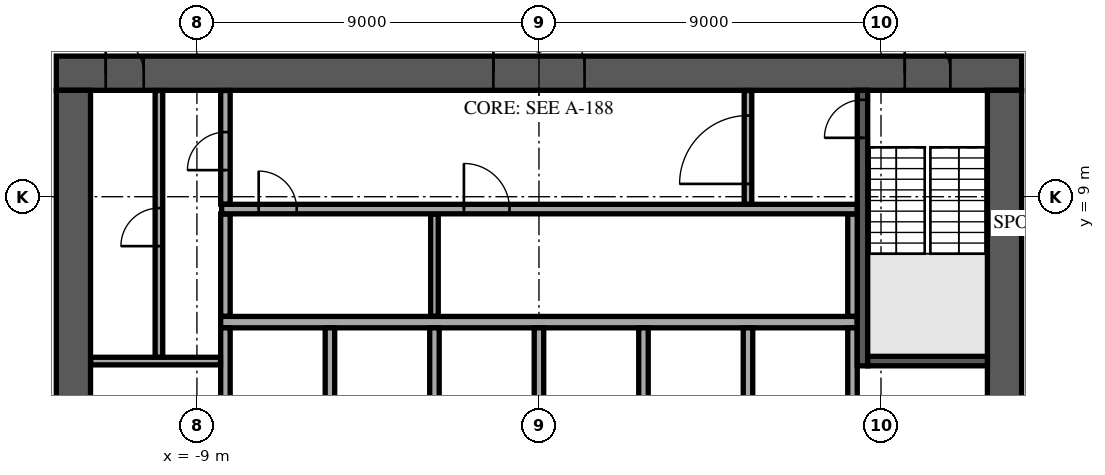
"""IFC4 building model, lengths in metres.
Left out: names, types, materials, properties, quantities, classifications, styles, units other than length and angle.
Written with IfcOpenShell. Run it as: python <this file> out.ifc"""

import sys

from ifc_helpers import new_model, si_unit, direction, frame, frame_2d, origin, place, context, subcontext, project, spatial, rectangle, extrude, element, fill, save


model = new_model("IFC4")
c1 = context("Model", 3, precision=1e-05, world=origin(), true_north=direction((0.0, 1.0)))
c2 = subcontext(c1, "Body", "Model", "MODEL_VIEW")
j1 = project(units=[si_unit("LENGTHUNIT", "METRE"), si_unit("PLANEANGLEUNIT", "RADIAN")], contexts=[c1])
p1 = place(None, origin())
s1 = spatial("IfcSite", under=j1, at=p1, CompositionType="ELEMENT")
p2 = place(p1, origin())
s2 = spatial("IfcBuilding", under=s1, at=p2, CompositionType="ELEMENT")
p3 = place(p2, frame((0.0, 0.0, 189.3)))
s3 = spatial("IfcBuildingStorey", under=s2, at=p3, CompositionType="ELEMENT", Elevation=189.3)
p4 = place(p3, frame((-12.7, 12.25, 0.0), z_axis=(0.0, 0.0, 1.0), x_axis=(1.0, 0.0, 0.0)))
e1 = element("IfcWall", 1, at=p4, inside=s3, PredefinedType="SHEAR", context=c2, shape_type="SweptSolid", body=[
    extrude(rectangle(XDim=25.4, YDim=0.9, at=frame_2d((12.7, 0.0))), origin(), (0.0, 0.0, 1.0), 3.62),
])
p5 = place(p4, frame((11.5, 0.0, 0.0)))
e2 = element("IfcOpeningElement", 2, at=p5, cuts=e1, PredefinedType="OPENING", context=c2, shape_type="SweptSolid", body=[
    extrude(rectangle(XDim=2.4, YDim=2.4, at=frame_2d((1.2, 1.2))), frame((0.0, 0.46, 0.0), z_axis=(0.0, -1.0, 0.0), x_axis=(1.0, 0.0, 0.0)), (0.0, 0.0, 1.0), 0.92),
])
p6 = place(p4, frame((22.325, 0.0, 0.0)))
e3 = element("IfcOpeningElement", 3, at=p6, cuts=e1, PredefinedType="OPENING", context=c2, shape_type="SweptSolid", body=[
    extrude(rectangle(XDim=1.2, YDim=2.1, at=frame_2d((0.6, 1.05))), frame((0.0, 0.46, 0.0), z_axis=(0.0, -1.0, 0.0), x_axis=(1.0, 0.0, 0.0)), (0.0, 0.0, 1.0), 0.92),
])
p7 = place(p4, frame((1.3, 0.0, 0.0)))
e4 = element("IfcOpeningElement", 4, at=p7, cuts=e1, PredefinedType="OPENING", context=c2, shape_type="SweptSolid", body=[
    extrude(rectangle(XDim=1.0, YDim=2.1, at=frame_2d((0.5, 1.05))), frame((0.0, 0.46, 0.0), z_axis=(0.0, -1.0, 0.0), x_axis=(1.0, 0.0, 0.0)), (0.0, 0.0, 1.0), 0.92),
])
p8 = place(p3, frame((12.25, -11.8, 0.0), z_axis=(0.0, 0.0, 1.0), x_axis=(0.0, 1.0, 0.0)))
e5 = element("IfcWall", 5, at=p8, inside=s3, PredefinedType="SHEAR", context=c2, shape_type="SweptSolid", body=[
    extrude(rectangle(XDim=23.6, YDim=0.9, at=frame_2d((11.8, 0.0))), origin(), (0.0, 0.0, 1.0), 3.62),
])
p9 = place(p8, frame((10.6, 0.0, 0.0)))
e6 = element("IfcOpeningElement", 6, at=p9, cuts=e5, PredefinedType="OPENING", context=c2, shape_type="SweptSolid", body=[
    extrude(rectangle(XDim=2.4, YDim=2.4, at=frame_2d((1.2, 1.2))), frame((0.0, 0.46, 0.0), z_axis=(0.0, -1.0, 0.0), x_axis=(1.0, 0.0, 0.0)), (0.0, 0.0, 1.0), 0.92),
])
p10 = place(p3, frame((-12.25, -11.8, 0.0), z_axis=(0.0, 0.0, 1.0), x_axis=(0.0, 1.0, 0.0)))
e7 = element("IfcWall", 7, at=p10, inside=s3, PredefinedType="SHEAR", context=c2, shape_type="SweptSolid", body=[
    extrude(rectangle(XDim=23.6, YDim=0.9, at=frame_2d((11.8, 0.0))), origin(), (0.0, 0.0, 1.0), 3.62),
])
p11 = place(p10, frame((10.6, 0.0, 0.0)))
e8 = element("IfcOpeningElement", 8, at=p11, cuts=e7, PredefinedType="OPENING", context=c2, shape_type="SweptSolid", body=[
    extrude(rectangle(XDim=2.4, YDim=2.4, at=frame_2d((1.2, 1.2))), frame((0.0, 0.46, 0.0), z_axis=(0.0, -1.0, 0.0), x_axis=(1.0, 0.0, 0.0)), (0.0, 0.0, 1.0), 0.92),
])
p12 = place(p3, frame((-8.375, 5.7, 0.0), z_axis=(0.0, 0.0, 1.0), x_axis=(1.0, 0.0, 0.0)))
e9 = element("IfcWall", 9, at=p12, inside=s3, PredefinedType="SOLIDWALL", context=c2, shape_type="SweptSolid", body=[
    extrude(rectangle(XDim=16.75, YDim=0.3, at=frame_2d((8.375, 0.0))), origin(), (0.0, 0.0, 1.0), 3.62),
])
for number, where, z_axis, x_axis in (
    (10, (-8.25, 2.85, 0.0), (0.0, 0.0, 1.0), (0.0, 1.0, 0.0)),
    (11, (-5.5, 2.85, 0.0), (0.0, 0.0, 1.0), (0.0, 1.0, 0.0)),
    (12, (-2.75, 2.85, 0.0), (0.0, 0.0, 1.0), (0.0, 1.0, 0.0)),
    (13, (0.0, 2.85, 0.0), (0.0, 0.0, 1.0), (0.0, 1.0, 0.0)),
    (14, (2.75, 2.85, 0.0), (0.0, 0.0, 1.0), (0.0, 1.0, 0.0)),
    (15, (5.5, 2.85, 0.0), (0.0, 0.0, 1.0), (0.0, 1.0, 0.0)),
    (16, (8.25, 2.85, 0.0), (0.0, 0.0, 1.0), (0.0, 1.0, 0.0)),
):
    element("IfcWall", number, at=place(p3, frame(where, z_axis=z_axis, x_axis=x_axis)), inside=s3, PredefinedType="SOLIDWALL", context=c2, shape_type="SweptSolid", body=[
        extrude(rectangle(XDim=2.7, YDim=0.25, at=frame_2d((1.35, 0.0))), origin(), (0.0, 0.0, 1.0), 3.62),
    ])
p13 = place(p3, frame((8.512, 4.55, 0.0), z_axis=(0.0, 0.0, 1.0), x_axis=(0.0, 1.0, 0.0)))
e17 = element("IfcWall", 17, at=p13, inside=s3, PredefinedType="SOLIDWALL", context=c2, shape_type="SweptSolid", body=[
    extrude(rectangle(XDim=7.25, YDim=0.275, at=frame_2d((3.625, 0.0))), origin(), (0.0, 0.0, 1.0), 3.62),
])
p14 = place(p13, frame((6.0, 0.0, 0.0)))
e18 = element("IfcOpeningElement", 18, at=p14, cuts=e17, PredefinedType="OPENING", context=c2, shape_type="SweptSolid", body=[
    extrude(rectangle(XDim=1.0, YDim=2.1, at=frame_2d((0.5, 1.05))), frame((0.0, 0.147, 0.0), z_axis=(0.0, -1.0, 0.0), x_axis=(1.0, 0.0, 0.0)), (0.0, 0.0, 1.0), 0.295),
])
p15 = place(p3, frame((8.65, 4.675, 0.0), z_axis=(0.0, 0.0, 1.0), x_axis=(1.0, 0.0, 0.0)))
e19 = element("IfcWall", 19, at=p15, inside=s3, PredefinedType="SOLIDWALL", context=c2, shape_type="SweptSolid", body=[
    extrude(rectangle(XDim=3.15, YDim=0.25, at=frame_2d((1.575, 0.0))), origin(), (0.0, 0.0, 1.0), 3.62),
])
p16 = place(p3, frame((-11.795, 4.675, 0.0), z_axis=(0.0, 0.0, 1.0), x_axis=(1.0, 0.0, 0.0)))
e20 = element("IfcWall", 20, at=p16, inside=s3, PredefinedType="PARTITIONING", context=c2, shape_type="SweptSolid", body=[
    extrude(rectangle(XDim=3.415, YDim=0.2, at=frame_2d((1.708, 0.0))), origin(), (0.0, 0.0, 1.0), 3.62),
])
p17 = place(p3, frame((-10.0, 4.78, 0.0), z_axis=(0.0, 0.0, 1.0), x_axis=(0.0, 1.0, 0.0)))
e21 = element("IfcWall", 21, at=p17, inside=s3, PredefinedType="PARTITIONING", context=c2, shape_type="SweptSolid", body=[
    extrude(rectangle(XDim=7.015, YDim=0.2, at=frame_2d((3.507, 0.0))), origin(), (0.0, 0.0, 1.0), 3.62),
])
p18 = place(p17, frame((2.92, 0.0, 0.0)))
e22 = element("IfcOpeningElement", 22, at=p18, cuts=e21, PredefinedType="OPENING", context=c2, shape_type="SweptSolid", body=[
    extrude(rectangle(XDim=1.0, YDim=2.1, at=frame_2d((0.5, 1.05))), frame((0.0, 0.11, 0.0), z_axis=(0.0, -1.0, 0.0), x_axis=(1.0, 0.0, 0.0)), (0.0, 0.0, 1.0), 0.22),
])
p19 = place(p3, frame((-8.25, 5.855, 0.0), z_axis=(0.0, 0.0, 1.0), x_axis=(0.0, 1.0, 0.0)))
e23 = element("IfcWall", 23, at=p19, inside=s3, PredefinedType="PARTITIONING", context=c2, shape_type="SweptSolid", body=[
    extrude(rectangle(XDim=2.69, YDim=0.25, at=frame_2d((1.345, 0.0))), origin(), (0.0, 0.0, 1.0), 3.62),
])
p20 = place(p3, frame((-2.75, 5.855, 0.0), z_axis=(0.0, 0.0, 1.0), x_axis=(0.0, 1.0, 0.0)))
e24 = element("IfcWall", 24, at=p20, inside=s3, PredefinedType="PARTITIONING", context=c2, shape_type="SweptSolid", body=[
    extrude(rectangle(XDim=2.69, YDim=0.2, at=frame_2d((1.345, 0.0))), origin(), (0.0, 0.0, 1.0), 3.62),
])
p21 = place(p3, frame((8.25, 5.855, 0.0), z_axis=(0.0, 0.0, 1.0), x_axis=(0.0, 1.0, 0.0)))
e25 = element("IfcWall", 25, at=p21, inside=s3, PredefinedType="PARTITIONING", context=c2, shape_type="SweptSolid", body=[
    extrude(rectangle(XDim=2.69, YDim=0.25, at=frame_2d((1.345, 0.0))), origin(), (0.0, 0.0, 1.0), 3.62),
])
p22 = place(p3, frame((-8.35, 8.675, 0.0), z_axis=(0.0, 0.0, 1.0), x_axis=(1.0, 0.0, 0.0)))
e26 = element("IfcWall", 26, at=p22, inside=s3, PredefinedType="PARTITIONING", context=c2, shape_type="SweptSolid", body=[
    extrude(rectangle(XDim=16.72, YDim=0.25, at=frame_2d((8.36, 0.0))), origin(), (0.0, 0.0, 1.0), 3.62),
])
p23 = place(p22, frame((0.975, 0.0, 0.0)))
e27 = element("IfcOpeningElement", 27, at=p23, cuts=e26, PredefinedType="OPENING", context=c2, shape_type="SweptSolid", body=[
    extrude(rectangle(XDim=1.0, YDim=2.1, at=frame_2d((0.5, 1.05))), frame((0.0, 0.135, 0.0), z_axis=(0.0, -1.0, 0.0), x_axis=(1.0, 0.0, 0.0)), (0.0, 0.0, 1.0), 0.27),
])
p24 = place(p22, frame((6.375, 0.0, 0.0)))
e28 = element("IfcOpeningElement", 28, at=p24, cuts=e26, PredefinedType="OPENING", context=c2, shape_type="SweptSolid", body=[
    extrude(rectangle(XDim=1.2, YDim=2.1, at=frame_2d((0.6, 1.05))), frame((0.0, 0.135, 0.0), z_axis=(0.0, -1.0, 0.0), x_axis=(1.0, 0.0, 0.0)), (0.0, 0.0, 1.0), 0.27),
])
p25 = place(p3, frame((-8.25, 8.805, 0.0), z_axis=(0.0, 0.0, 1.0), x_axis=(0.0, 1.0, 0.0)))
e29 = element("IfcWall", 29, at=p25, inside=s3, PredefinedType="PARTITIONING", context=c2, shape_type="SweptSolid", body=[
    extrude(rectangle(XDim=2.99, YDim=0.25, at=frame_2d((1.495, 0.0))), origin(), (0.0, 0.0, 1.0), 3.62),
])
p26 = place(p25, frame((0.895, 0.0, 0.0)))
e30 = element("IfcOpeningElement", 30, at=p26, cuts=e29, PredefinedType="OPENING", context=c2, shape_type="SweptSolid", body=[
    extrude(rectangle(XDim=1.0, YDim=2.1, at=frame_2d((0.5, 1.05))), frame((0.0, 0.135, 0.0), z_axis=(0.0, -1.0, 0.0), x_axis=(1.0, 0.0, 0.0)), (0.0, 0.0, 1.0), 0.27),
])
p27 = place(p3, frame((5.5, 8.805, 0.0), z_axis=(0.0, 0.0, 1.0), x_axis=(0.0, 1.0, 0.0)))
e31 = element("IfcWall", 31, at=p27, inside=s3, PredefinedType="PARTITIONING", context=c2, shape_type="SweptSolid", body=[
    extrude(rectangle(XDim=2.99, YDim=0.2, at=frame_2d((1.495, 0.0))), origin(), (0.0, 0.0, 1.0), 3.62),
])
p28 = place(p27, frame((0.532, 0.0, 0.0)))
e32 = element("IfcOpeningElement", 32, at=p28, cuts=e31, PredefinedType="OPENING", context=c2, shape_type="SweptSolid", body=[
    extrude(rectangle(XDim=1.8, YDim=2.1, at=frame_2d((0.9, 1.05))), frame((0.0, 0.11, 0.0), z_axis=(0.0, -1.0, 0.0), x_axis=(1.0, 0.0, 0.0)), (0.0, 0.0, 1.0), 0.22),
])
p29 = place(p3, frame((2.286, 34.715, 0.0), z_axis=(0.0, 0.0, 1.0), x_axis=(-0.754708272811, -0.656060532993, 0.0)))
e33 = element("IfcWall", 33, at=p29, inside=s3, PredefinedType="STANDARD", context=c2, shape_type="SweptSolid", body=[
    extrude(rectangle(XDim=49.0, YDim=0.6, at=frame_2d((24.5, 0.0))), origin(), (0.0, 0.0, 1.0), 3.62),
])
p30 = place(p29, frame((1.227, 0.0, 0.9)))
e34 = element("IfcOpeningElement", 34, at=p30, cuts=e33, PredefinedType="OPENING", context=c2, shape_type="SweptSolid", body=[
    extrude(rectangle(XDim=2.0, YDim=2.1, at=frame_2d((1.0, 1.05))), frame((0.0, 0.31, 0.0), z_axis=(0.0, -1.0, 0.0), x_axis=(1.0, 0.0, 0.0)), (0.0, 0.0, 1.0), 0.62),
])
p31 = place(p29, frame((5.682, 0.0, 0.9)))
e35 = element("IfcOpeningElement", 35, at=p31, cuts=e33, PredefinedType="OPENING", context=c2, shape_type="SweptSolid", body=[
    extrude(rectangle(XDim=2.0, YDim=2.1, at=frame_2d((1.0, 1.05))), frame((0.0, 0.31, 0.0), z_axis=(0.0, -1.0, 0.0), x_axis=(1.0, 0.0, 0.0)), (0.0, 0.0, 1.0), 0.62),
])
p32 = place(p29, frame((10.136, 0.0, 0.9)))
e36 = element("IfcOpeningElement", 36, at=p32, cuts=e33, PredefinedType="OPENING", context=c2, shape_type="SweptSolid", body=[
    extrude(rectangle(XDim=2.0, YDim=2.1, at=frame_2d((1.0, 1.05))), frame((0.0, 0.31, 0.0), z_axis=(0.0, -1.0, 0.0), x_axis=(1.0, 0.0, 0.0)), (0.0, 0.0, 1.0), 0.62),
])
p33 = place(p29, frame((14.591, 0.0, 0.9)))
e37 = element("IfcOpeningElement", 37, at=p33, cuts=e33, PredefinedType="OPENING", context=c2, shape_type="SweptSolid", body=[
    extrude(rectangle(XDim=2.0, YDim=2.1, at=frame_2d((1.0, 1.05))), frame((0.0, 0.31, 0.0), z_axis=(0.0, -1.0, 0.0), x_axis=(1.0, 0.0, 0.0)), (0.0, 0.0, 1.0), 0.62),
])
p34 = place(p29, frame((19.045, 0.0, 0.9)))
e38 = element("IfcOpeningElement", 38, at=p34, cuts=e33, PredefinedType="OPENING", context=c2, shape_type="SweptSolid", body=[
    extrude(rectangle(XDim=2.0, YDim=2.1, at=frame_2d((1.0, 1.05))), frame((0.0, 0.31, 0.0), z_axis=(0.0, -1.0, 0.0), x_axis=(1.0, 0.0, 0.0)), (0.0, 0.0, 1.0), 0.62),
])
p35 = place(p29, frame((23.5, 0.0, 0.9)))
e39 = element("IfcOpeningElement", 39, at=p35, cuts=e33, PredefinedType="OPENING", context=c2, shape_type="SweptSolid", body=[
    extrude(rectangle(XDim=2.0, YDim=2.1, at=frame_2d((1.0, 1.05))), frame((0.0, 0.31, 0.0), z_axis=(0.0, -1.0, 0.0), x_axis=(1.0, 0.0, 0.0)), (0.0, 0.0, 1.0), 0.62),
])
p36 = place(p29, frame((27.955, 0.0, 0.9)))
e40 = element("IfcOpeningElement", 40, at=p36, cuts=e33, PredefinedType="OPENING", context=c2, shape_type="SweptSolid", body=[
    extrude(rectangle(XDim=2.0, YDim=2.1, at=frame_2d((1.0, 1.05))), frame((0.0, 0.31, 0.0), z_axis=(0.0, -1.0, 0.0), x_axis=(1.0, 0.0, 0.0)), (0.0, 0.0, 1.0), 0.62),
])
p37 = place(p29, frame((32.409, 0.0, 0.9)))
e41 = element("IfcOpeningElement", 41, at=p37, cuts=e33, PredefinedType="OPENING", context=c2, shape_type="SweptSolid", body=[
    extrude(rectangle(XDim=2.0, YDim=2.1, at=frame_2d((1.0, 1.05))), frame((0.0, 0.31, 0.0), z_axis=(0.0, -1.0, 0.0), x_axis=(1.0, 0.0, 0.0)), (0.0, 0.0, 1.0), 0.62),
])
p38 = place(p29, frame((36.864, 0.0, 0.9)))
e42 = element("IfcOpeningElement", 42, at=p38, cuts=e33, PredefinedType="OPENING", context=c2, shape_type="SweptSolid", body=[
    extrude(rectangle(XDim=2.0, YDim=2.1, at=frame_2d((1.0, 1.05))), frame((0.0, 0.31, 0.0), z_axis=(0.0, -1.0, 0.0), x_axis=(1.0, 0.0, 0.0)), (0.0, 0.0, 1.0), 0.62),
])
p39 = place(p29, frame((41.318, 0.0, 0.9)))
e43 = element("IfcOpeningElement", 43, at=p39, cuts=e33, PredefinedType="OPENING", context=c2, shape_type="SweptSolid", body=[
    extrude(rectangle(XDim=2.0, YDim=2.1, at=frame_2d((1.0, 1.05))), frame((0.0, 0.31, 0.0), z_axis=(0.0, -1.0, 0.0), x_axis=(1.0, 0.0, 0.0)), (0.0, 0.0, 1.0), 0.62),
])
p40 = place(p29, frame((45.773, 0.0, 0.9)))
e44 = element("IfcOpeningElement", 44, at=p40, cuts=e33, PredefinedType="OPENING", context=c2, shape_type="SweptSolid", body=[
    extrude(rectangle(XDim=2.0, YDim=2.1, at=frame_2d((1.0, 1.05))), frame((0.0, 0.31, 0.0), z_axis=(0.0, -1.0, 0.0), x_axis=(1.0, 0.0, 0.0)), (0.0, 0.0, 1.0), 0.62),
])
p41 = place(p3, frame((35.208, 4.768, 0.0), z_axis=(0.0, 0.0, 1.0), x_axis=(-0.656058749455, 0.754709823219, 0.0)))
e45 = element("IfcWall", 45, at=p41, inside=s3, PredefinedType="STANDARD", context=c2, shape_type="SweptSolid", body=[
    extrude(rectangle(XDim=39.0, YDim=0.6, at=frame_2d((19.5, 0.0))), origin(), (0.0, 0.0, 1.0), 3.62),
])
p42 = place(p41, frame((1.217, 0.0, 0.9)))
e46 = element("IfcOpeningElement", 46, at=p42, cuts=e45, PredefinedType="OPENING", context=c2, shape_type="SweptSolid", body=[
    extrude(rectangle(XDim=1.9, YDim=2.1, at=frame_2d((0.95, 1.05))), frame((0.0, 0.31, 0.0), z_axis=(0.0, -1.0, 0.0), x_axis=(1.0, 0.0, 0.0)), (0.0, 0.0, 1.0), 0.62),
])
p43 = place(p41, frame((5.55, 0.0, 0.9)))
e47 = element("IfcOpeningElement", 47, at=p43, cuts=e45, PredefinedType="OPENING", context=c2, shape_type="SweptSolid", body=[
    extrude(rectangle(XDim=1.9, YDim=2.1, at=frame_2d((0.95, 1.05))), frame((0.0, 0.31, 0.0), z_axis=(0.0, -1.0, 0.0), x_axis=(1.0, 0.0, 0.0)), (0.0, 0.0, 1.0), 0.62),
])
p44 = place(p41, frame((9.883, 0.0, 0.9)))
e48 = element("IfcOpeningElement", 48, at=p44, cuts=e45, PredefinedType="OPENING", context=c2, shape_type="SweptSolid", body=[
    extrude(rectangle(XDim=1.9, YDim=2.1, at=frame_2d((0.95, 1.05))), frame((0.0, 0.31, 0.0), z_axis=(0.0, -1.0, 0.0), x_axis=(1.0, 0.0, 0.0)), (0.0, 0.0, 1.0), 0.62),
])
p45 = place(p41, frame((14.217, 0.0, 0.9)))
e49 = element("IfcOpeningElement", 49, at=p45, cuts=e45, PredefinedType="OPENING", context=c2, shape_type="SweptSolid", body=[
    extrude(rectangle(XDim=1.9, YDim=2.1, at=frame_2d((0.95, 1.05))), frame((0.0, 0.31, 0.0), z_axis=(0.0, -1.0, 0.0), x_axis=(1.0, 0.0, 0.0)), (0.0, 0.0, 1.0), 0.62),
])
p46 = place(p41, frame((18.55, 0.0, 0.9)))
e50 = element("IfcOpeningElement", 50, at=p46, cuts=e45, PredefinedType="OPENING", context=c2, shape_type="SweptSolid", body=[
    extrude(rectangle(XDim=1.9, YDim=2.1, at=frame_2d((0.95, 1.05))), frame((0.0, 0.31, 0.0), z_axis=(0.0, -1.0, 0.0), x_axis=(1.0, 0.0, 0.0)), (0.0, 0.0, 1.0), 0.62),
])
p47 = place(p41, frame((22.883, 0.0, 0.9)))
e51 = element("IfcOpeningElement", 51, at=p47, cuts=e45, PredefinedType="OPENING", context=c2, shape_type="SweptSolid", body=[
    extrude(rectangle(XDim=1.9, YDim=2.1, at=frame_2d((0.95, 1.05))), frame((0.0, 0.31, 0.0), z_axis=(0.0, -1.0, 0.0), x_axis=(1.0, 0.0, 0.0)), (0.0, 0.0, 1.0), 0.62),
])
p48 = place(p41, frame((27.217, 0.0, 0.9)))
e52 = element("IfcOpeningElement", 52, at=p48, cuts=e45, PredefinedType="OPENING", context=c2, shape_type="SweptSolid", body=[
    extrude(rectangle(XDim=1.9, YDim=2.1, at=frame_2d((0.95, 1.05))), frame((0.0, 0.31, 0.0), z_axis=(0.0, -1.0, 0.0), x_axis=(1.0, 0.0, 0.0)), (0.0, 0.0, 1.0), 0.62),
])
p49 = place(p41, frame((31.55, 0.0, 0.9)))
e53 = element("IfcOpeningElement", 53, at=p49, cuts=e45, PredefinedType="OPENING", context=c2, shape_type="SweptSolid", body=[
    extrude(rectangle(XDim=1.9, YDim=2.1, at=frame_2d((0.95, 1.05))), frame((0.0, 0.31, 0.0), z_axis=(0.0, -1.0, 0.0), x_axis=(1.0, 0.0, 0.0)), (0.0, 0.0, 1.0), 0.62),
])
p50 = place(p41, frame((35.883, 0.0, 0.9)))
e54 = element("IfcOpeningElement", 54, at=p50, cuts=e45, PredefinedType="OPENING", context=c2, shape_type="SweptSolid", body=[
    extrude(rectangle(XDim=1.9, YDim=2.1, at=frame_2d((0.95, 1.05))), frame((0.0, 0.31, 0.0), z_axis=(0.0, -1.0, 0.0), x_axis=(1.0, 0.0, 0.0)), (0.0, 0.0, 1.0), 0.62),
])
p51 = place(p3, frame((-26.208, 2.616, 0.0), z_axis=(0.0, 0.0, 1.0), x_axis=(0.754710701231, 0.656057739416, 0.0)))
e55 = element("IfcWall", 55, at=p51, inside=s3, PredefinedType="PARTITIONING", context=c2, shape_type="SweptSolid", body=[
    extrude(rectangle(XDim=36.126, YDim=0.15, at=frame_2d((18.063, 0.0))), origin(), (0.0, 0.0, 1.0), 3.17),
])
p52 = place(p51, frame((2.551, 0.0, 0.0)))
e56 = element("IfcOpeningElement", 56, at=p52, cuts=e55, PredefinedType="OPENING", context=c2, shape_type="SweptSolid", body=[
    extrude(rectangle(XDim=1.0, YDim=2.1, at=frame_2d((0.5, 1.05))), frame((0.0, 0.085, 0.0), z_axis=(0.0, -1.0, 0.0), x_axis=(1.0, 0.0, 0.0)), (0.0, 0.0, 1.0), 0.17),
])
p53 = place(p51, frame((15.362, 0.0, 0.0)))
e57 = element("IfcOpeningElement", 57, at=p53, cuts=e55, PredefinedType="OPENING", context=c2, shape_type="SweptSolid", body=[
    extrude(rectangle(XDim=1.0, YDim=2.1, at=frame_2d((0.5, 1.05))), frame((0.0, 0.085, 0.0), z_axis=(0.0, -1.0, 0.0), x_axis=(1.0, 0.0, 0.0)), (0.0, 0.0, 1.0), 0.17),
])
p54 = place(p51, frame((25.542, 0.0, 0.0)))
e58 = element("IfcOpeningElement", 58, at=p54, cuts=e55, PredefinedType="OPENING", context=c2, shape_type="SweptSolid", body=[
    extrude(rectangle(XDim=1.8, YDim=2.1, at=frame_2d((0.9, 1.05))), frame((0.0, 0.085, 0.0), z_axis=(0.0, -1.0, 0.0), x_axis=(1.0, 0.0, 0.0)), (0.0, 0.0, 1.0), 0.17),
])
p55 = place(p3, frame((8.103, 24.087, 0.0), z_axis=(0.0, 0.0, 1.0), x_axis=(0.656048444225, -0.754718781289, 0.0)))
e59 = element("IfcWall", 59, at=p55, inside=s3, PredefinedType="PARTITIONING", context=c2, shape_type="SweptSolid", body=[
    extrude(rectangle(XDim=25.8, YDim=0.15, at=frame_2d((12.9, 0.0))), origin(), (0.0, 0.0, 1.0), 3.17),
])
p56 = place(p5, origin())
e60 = element("IfcDoor", 60, at=p56, inside=s3, OperationType="SINGLE_SWING_LEFT", PredefinedType="DOOR", context=c2, shape_type="SweptSolid", body=[
    extrude(rectangle(XDim=2.4, YDim=2.4, at=frame_2d((1.2, 1.2))), frame((0.0, 0.025, 0.0), z_axis=(0.0, -1.0, 0.0), x_axis=(1.0, 0.0, 0.0)), (0.0, 0.0, 1.0), 0.05),
])
fill(e2, e60)
p57 = place(p6, origin())
e61 = element("IfcDoor", 61, at=p57, inside=s3, OperationType="SINGLE_SWING_LEFT", PredefinedType="DOOR", context=c2, shape_type="SweptSolid", body=[
    extrude(rectangle(XDim=1.2, YDim=2.1, at=frame_2d((0.6, 1.05))), frame((0.0, 0.025, 0.0), z_axis=(0.0, -1.0, 0.0), x_axis=(1.0, 0.0, 0.0)), (0.0, 0.0, 1.0), 0.05),
])
fill(e3, e61)
p58 = place(p7, origin())
e62 = element("IfcDoor", 62, at=p58, inside=s3, OperationType="SINGLE_SWING_LEFT", PredefinedType="DOOR", context=c2, shape_type="SweptSolid", body=[
    extrude(rectangle(XDim=1.0, YDim=2.1, at=frame_2d((0.5, 1.05))), frame((0.0, 0.025, 0.0), z_axis=(0.0, -1.0, 0.0), x_axis=(1.0, 0.0, 0.0)), (0.0, 0.0, 1.0), 0.05),
])
fill(e4, e62)
p59 = place(p14, origin())
e63 = element("IfcDoor", 63, at=p59, inside=s3, OperationType="SINGLE_SWING_LEFT", PredefinedType="DOOR", context=c2, shape_type="SweptSolid", body=[
    extrude(rectangle(XDim=1.0, YDim=2.1, at=frame_2d((0.5, 1.05))), frame((0.0, 0.025, 0.0), z_axis=(0.0, -1.0, 0.0), x_axis=(1.0, 0.0, 0.0)), (0.0, 0.0, 1.0), 0.05),
])
fill(e18, e63)
p60 = place(p18, origin())
e64 = element("IfcDoor", 64, at=p60, inside=s3, OperationType="SINGLE_SWING_LEFT", PredefinedType="DOOR", context=c2, shape_type="SweptSolid", body=[
    extrude(rectangle(XDim=1.0, YDim=2.1, at=frame_2d((0.5, 1.05))), frame((0.0, 0.025, 0.0), z_axis=(0.0, -1.0, 0.0), x_axis=(1.0, 0.0, 0.0)), (0.0, 0.0, 1.0), 0.05),
])
fill(e22, e64)
p61 = place(p26, origin())
e65 = element("IfcDoor", 65, at=p61, inside=s3, OperationType="SINGLE_SWING_LEFT", PredefinedType="DOOR", context=c2, shape_type="SweptSolid", body=[
    extrude(rectangle(XDim=1.0, YDim=2.1, at=frame_2d((0.5, 1.05))), frame((0.0, 0.025, 0.0), z_axis=(0.0, -1.0, 0.0), x_axis=(1.0, 0.0, 0.0)), (0.0, 0.0, 1.0), 0.05),
])
fill(e30, e65)
p62 = place(p23, origin())
e66 = element("IfcDoor", 66, at=p62, inside=s3, OperationType="SINGLE_SWING_LEFT", PredefinedType="DOOR", context=c2, shape_type="SweptSolid", body=[
    extrude(rectangle(XDim=1.0, YDim=2.1, at=frame_2d((0.5, 1.05))), frame((0.0, 0.025, 0.0), z_axis=(0.0, -1.0, 0.0), x_axis=(1.0, 0.0, 0.0)), (0.0, 0.0, 1.0), 0.05),
])
fill(e27, e66)
p63 = place(p24, origin())
e67 = element("IfcDoor", 67, at=p63, inside=s3, OperationType="SINGLE_SWING_LEFT", PredefinedType="DOOR", context=c2, shape_type="SweptSolid", body=[
    extrude(rectangle(XDim=1.2, YDim=2.1, at=frame_2d((0.6, 1.05))), frame((0.0, 0.025, 0.0), z_axis=(0.0, -1.0, 0.0), x_axis=(1.0, 0.0, 0.0)), (0.0, 0.0, 1.0), 0.05),
])
fill(e28, e67)
p64 = place(p28, origin())
e68 = element("IfcDoor", 68, at=p64, inside=s3, OperationType="SINGLE_SWING_LEFT", PredefinedType="DOOR", context=c2, shape_type="SweptSolid", body=[
    extrude(rectangle(XDim=1.8, YDim=2.1, at=frame_2d((0.9, 1.05))), frame((0.0, 0.025, 0.0), z_axis=(0.0, -1.0, 0.0), x_axis=(1.0, 0.0, 0.0)), (0.0, 0.0, 1.0), 0.05),
])
fill(e32, e68)
save(model, sys.argv[1])
